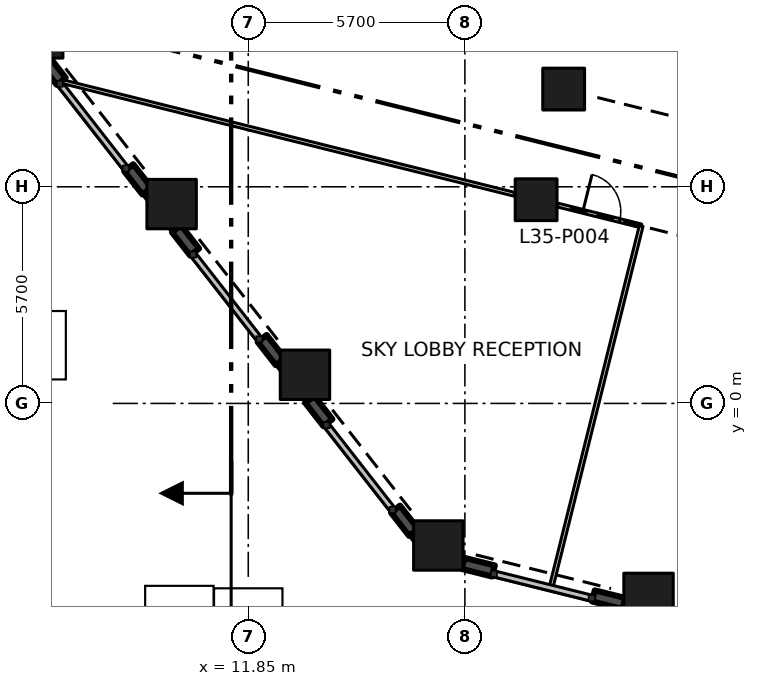
"""IFC4 building model, lengths in metres.
Left out: names, types, materials, properties, quantities, classifications, styles, units other than length and angle.
Written with IfcOpenShell. Run it as: python <this file> out.ifc"""

import sys

from ifc_helpers import new_model, si_unit, direction, frame, frame_2d, origin, origin_2d, place, context, subcontext, project, spatial, rectangle, extrude, element, fill, save


model = new_model("IFC4")
c1 = context("Model", 3, precision=1e-05, world=origin(), true_north=direction((0.0, 1.0)))
c2 = subcontext(c1, "Body", "Model", "MODEL_VIEW")
j1 = project(units=[si_unit("LENGTHUNIT", "METRE"), si_unit("PLANEANGLEUNIT", "RADIAN")], contexts=[c1])
p1 = place(None, origin())
s1 = spatial("IfcSite", under=j1, at=p1, CompositionType="ELEMENT")
p2 = place(p1, origin())
s2 = spatial("IfcBuilding", under=s1, at=p2, CompositionType="ELEMENT")
p3 = place(p2, frame((0.0, 0.0, 156.0)))
s3 = spatial("IfcBuildingStorey", under=s2, at=p3, CompositionType="ELEMENT", Elevation=156.0)
for number, where, z_axis, x_axis in (
    (1, (16.851, -3.738, 0.0), (0.0, 0.0, 1.0), (1.0, 0.0, 0.0)),
    (2, (13.342, 0.754, 0.0), (0.0, 0.0, 1.0), (1.0, 0.0, 0.0)),
    (3, (9.833, 5.245, 0.0), (0.0, 0.0, 1.0), (1.0, 0.0, 0.0)),
    (4, (6.323, 9.737, 0.0), (0.0, 0.0, 1.0), (1.0, 0.0, 0.0)),
    (5, (22.382, -5.117, 0.0), (0.0, 0.0, 1.0), (1.0, 0.0, 0.0)),
):
    element("IfcColumn", number, at=place(p3, frame(where, z_axis=z_axis, x_axis=x_axis)), inside=s3, PredefinedType="COLUMN", context=c2, shape_type="SweptSolid", body=[
        extrude(rectangle(XDim=1.3, YDim=1.3, at=origin_2d()), origin(), (0.0, 0.0, 1.0), 5.4),
    ])
for number, where, z_axis, x_axis in (
    (6, (19.424, 5.36, 0.0), (0.0, 0.0, 1.0), (1.0, 0.0, 0.0)),
    (7, (20.149, 8.271, 0.0), (0.0, 0.0, 1.0), (1.0, 0.0, 0.0)),
):
    element("IfcColumn", number, at=place(p3, frame(where, z_axis=z_axis, x_axis=x_axis)), inside=s3, PredefinedType="COLUMN", context=c2, shape_type="SweptSolid", body=[
        extrude(rectangle(XDim=1.1, YDim=1.1, at=origin_2d()), origin(), (0.0, 0.0, 1.0), 5.4),
    ])
p4 = place(p3, frame((6.908, 8.481, 0.0), z_axis=(0.0, 0.0, 1.0), x_axis=(0.970288137561, -0.241952330241, 0.0)))
e8 = element("IfcWall", 8, at=p4, inside=s3, PredefinedType="PARTITIONING", context=c2, shape_type="SweptSolid", body=[
    extrude(rectangle(XDim=12.311, YDim=0.1, at=frame_2d((6.156, 0.0))), origin(), (0.0, 0.0, 1.0), 5.1),
])
p5 = place(p3, frame((19.994, 5.218, 0.0), z_axis=(0.0, 0.0, 1.0), x_axis=(0.970313661105, -0.241849951567, 0.0)))
e9 = element("IfcWall", 9, at=p5, inside=s3, PredefinedType="PARTITIONING", context=c2, shape_type="SweptSolid", body=[
    extrude(rectangle(XDim=2.262, YDim=0.1, at=frame_2d((1.131, 0.0))), origin(), (0.0, 0.0, 1.0), 2.78),
])
p6 = place(p5, frame((0.68, 0.0, 0.0)))
e10 = element("IfcOpeningElement", 10, at=p6, cuts=e9, PredefinedType="OPENING", context=c2, shape_type="SweptSolid", body=[
    extrude(rectangle(XDim=1.0, YDim=2.1, at=frame_2d((0.5, 1.05))), frame((0.0, 0.06, 0.0), z_axis=(0.0, -1.0, 0.0), x_axis=(1.0, 0.0, 0.0)), (0.0, 0.0, 1.0), 0.12),
])
p7 = place(p3, frame((22.189, 4.671, 0.0), z_axis=(0.0, 0.0, 1.0), x_axis=(-0.241880791135, -0.970305973845, 0.0)))
e11 = element("IfcWall", 11, at=p7, inside=s3, PredefinedType="PARTITIONING", context=c2, shape_type="SweptSolid", body=[
    extrude(rectangle(XDim=9.826, YDim=0.1, at=frame_2d((4.913, 0.0))), origin(), (0.0, 0.0, 1.0), 5.1),
])
p8 = place(p3, frame((6.451, 9.087, 2.5), z_axis=(0.0, 0.0, 1.0), x_axis=(0.615683543254, -0.787993511754, 0.0)))
e12 = element("IfcWall", 12, at=p8, inside=s3, PredefinedType="SOLIDWALL", context=c2, shape_type="SweptSolid", body=[
    extrude(rectangle(XDim=4.438, YDim=0.3, at=frame_2d((2.219, 0.0))), origin(), (0.0, 0.0, 1.0), 1.8),
])
p9 = place(p3, frame((6.451, 9.087, 0.0), z_axis=(0.0, 0.0, 1.0), x_axis=(0.615509551601, -0.788129425848, 0.0)))
e13 = element("IfcWall", 13, at=p9, inside=s3, PredefinedType="SOLIDWALL", context=c2, shape_type="SweptSolid", body=[
    extrude(rectangle(XDim=0.775, YDim=0.3, at=frame_2d((0.388, 0.0))), origin(), (0.0, 0.0, 1.0), 2.5),
])
p10 = place(p3, frame((8.705, 6.201, 0.0), z_axis=(0.0, 0.0, 1.0), x_axis=(0.616291287595, -0.787518284762, 0.0)))
e14 = element("IfcWall", 14, at=p10, inside=s3, PredefinedType="SOLIDWALL", context=c2, shape_type="SweptSolid", body=[
    extrude(rectangle(XDim=0.776, YDim=0.3, at=frame_2d((0.388, 0.0))), origin(), (0.0, 0.0, 1.0), 2.5),
])
p11 = place(p3, frame((9.961, 4.595, 2.5), z_axis=(0.0, 0.0, 1.0), x_axis=(0.615619477922, -0.788043563773, 0.0)))
e15 = element("IfcWall", 15, at=p11, inside=s3, PredefinedType="SOLIDWALL", context=c2, shape_type="SweptSolid", body=[
    extrude(rectangle(XDim=4.436, YDim=0.3, at=frame_2d((2.218, 0.0))), origin(), (0.0, 0.0, 1.0), 1.8),
])
p12 = place(p3, frame((9.961, 4.595, 0.0), z_axis=(0.0, 0.0, 1.0), x_axis=(0.615356771204, -0.788248719716, 0.0)))
e16 = element("IfcWall", 16, at=p12, inside=s3, PredefinedType="SOLIDWALL", context=c2, shape_type="SweptSolid", body=[
    extrude(rectangle(XDim=0.775, YDim=0.3, at=frame_2d((0.388, 0.0))), origin(), (0.0, 0.0, 1.0), 2.5),
])
p13 = place(p3, frame((12.215, 1.709, 0.0), z_axis=(0.0, 0.0, 1.0), x_axis=(0.615925525188, -0.787804383983, 0.0)))
e17 = element("IfcWall", 17, at=p13, inside=s3, PredefinedType="SOLIDWALL", context=c2, shape_type="SweptSolid", body=[
    extrude(rectangle(XDim=0.774, YDim=0.3, at=frame_2d((0.387, 0.0))), origin(), (0.0, 0.0, 1.0), 2.5),
])
p14 = place(p3, frame((13.469, 0.104, 2.5), z_axis=(0.0, 0.0, 1.0), x_axis=(0.615622689486, -0.788041054888, 0.0)))
e18 = element("IfcWall", 18, at=p14, inside=s3, PredefinedType="SOLIDWALL", context=c2, shape_type="SweptSolid", body=[
    extrude(rectangle(XDim=4.438, YDim=0.3, at=frame_2d((2.219, 0.0))), origin(), (0.0, 0.0, 1.0), 1.8),
])
for number, where, z_axis, x_axis in (
    (19, (13.469, 0.104, 0.0), (0.0, 0.0, 1.0), (0.615, -0.788, 0.0)),
    (20, (15.724, -2.782, 0.0), (0.0, 0.0, 1.0), (0.615, -0.788, 0.0)),
):
    element("IfcWall", number, at=place(p3, frame(where, z_axis=z_axis, x_axis=x_axis)), inside=s3, PredefinedType="SOLIDWALL", context=c2, shape_type="SweptSolid", body=[
        extrude(rectangle(XDim=0.775, YDim=0.3, at=frame_2d((0.388, 0.0))), origin(), (0.0, 0.0, 1.0), 2.5),
    ])
p15 = place(p3, frame((17.501, -4.209, 2.5), z_axis=(0.0, 0.0, 1.0), x_axis=(0.970293811216, -0.241929576357, 0.0)))
e21 = element("IfcWall", 21, at=p15, inside=s3, PredefinedType="SOLIDWALL", context=c2, shape_type="SweptSolid", body=[
    extrude(rectangle(XDim=4.361, YDim=0.3, at=frame_2d((2.18, 0.0))), origin(), (0.0, 0.0, 1.0), 1.8),
])
for number, where, z_axis, x_axis in (
    (22, (17.501, -4.209, 0.0), (0.0, 0.0, 1.0), (0.97, -0.242, 0.0)),
    (23, (20.931, -5.064, 0.0), (0.0, 0.0, 1.0), (0.97, -0.242, 0.0)),
):
    element("IfcWall", number, at=place(p3, frame(where, z_axis=z_axis, x_axis=x_axis)), inside=s3, PredefinedType="SOLIDWALL", context=c2, shape_type="SweptSolid", body=[
        extrude(rectangle(XDim=0.826, YDim=0.3, at=frame_2d((0.413, 0.0))), origin(), (0.0, 0.0, 1.0), 2.5),
    ])
p16 = place(p6, origin())
e24 = element("IfcDoor", 24, at=p16, inside=s3, OperationType="SINGLE_SWING_LEFT", PredefinedType="DOOR", context=c2, shape_type="SweptSolid", body=[
    extrude(rectangle(XDim=1.0, YDim=2.1, at=frame_2d((0.5, 1.05))), frame((0.0, 0.025, 0.0), z_axis=(0.0, -1.0, 0.0), x_axis=(1.0, 0.0, 0.0)), (0.0, 0.0, 1.0), 0.05),
])
fill(e10, e24)
save(model, sys.argv[1])
